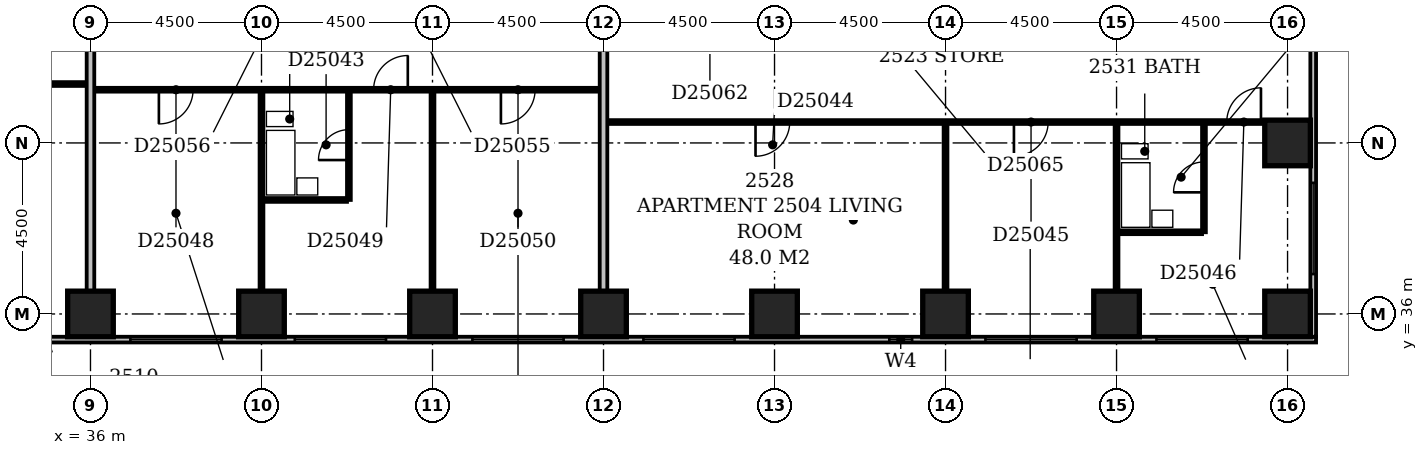
"""IFC4 building model, lengths in metres.
Left out: names, types, materials, properties, quantities, classifications, styles, units other than length and angle.
Written with IfcOpenShell. Run it as: python <this file> out.ifc"""

import sys

from ifc_helpers import new_model, si_unit, direction, frame, frame_2d, origin, origin_2d, place, context, subcontext, project, spatial, rectangle, extrude, element, fill, save


model = new_model("IFC4")
c1 = context("Model", 3, precision=1e-05, world=origin(), true_north=direction((0.0, 1.0)))
c2 = subcontext(c1, "Body", "Model", "MODEL_VIEW")
j1 = project(units=[si_unit("LENGTHUNIT", "METRE"), si_unit("PLANEANGLEUNIT", "RADIAN")], contexts=[c1])
p1 = place(None, origin())
s1 = spatial("IfcSite", under=j1, at=p1, CompositionType="ELEMENT")
p2 = place(p1, origin())
s2 = spatial("IfcBuilding", under=s1, at=p2, CompositionType="ELEMENT")
p3 = place(p2, frame((0.0, 0.0, 101.0)))
s3 = spatial("IfcBuildingStorey", under=s2, at=p3, CompositionType="ELEMENT", Elevation=101.0)
for number, where, z_axis, x_axis in (
    (1, (36.0, 36.0, -0.3), (0.0, 0.0, 1.0), (1.0, 0.0, 0.0)),
    (2, (40.5, 36.0, -0.3), (0.0, 0.0, 1.0), (1.0, 0.0, 0.0)),
    (3, (45.0, 36.0, -0.3), (0.0, 0.0, 1.0), (1.0, 0.0, 0.0)),
    (4, (49.5, 36.0, -0.3), (0.0, 0.0, 1.0), (1.0, 0.0, 0.0)),
    (5, (54.0, 36.0, -0.3), (0.0, 0.0, 1.0), (1.0, 0.0, 0.0)),
    (6, (58.5, 36.0, -0.3), (0.0, 0.0, 1.0), (1.0, 0.0, 0.0)),
    (7, (63.0, 36.0, -0.3), (0.0, 0.0, 1.0), (1.0, 0.0, 0.0)),
    (8, (67.5, 36.0, -0.3), (0.0, 0.0, 1.0), (1.0, 0.0, 0.0)),
    (9, (67.5, 40.5, -0.3), (0.0, 0.0, 1.0), (1.0, 0.0, 0.0)),
):
    element("IfcColumn", number, at=place(p3, frame(where, z_axis=z_axis, x_axis=x_axis)), inside=s3, PredefinedType="COLUMN", context=c2, shape_type="SweptSolid", body=[
        extrude(rectangle(XDim=1.2, YDim=1.2, at=origin_2d()), origin(), (0.0, 0.0, 1.0), 3.6),
    ])
p4 = place(p3, frame((23.1, 35.325, 0.0), z_axis=(0.0, 0.0, 1.0), x_axis=(1.0, 0.0, 0.0)))
e10 = element("IfcWall", 10, at=p4, inside=s3, PredefinedType="STANDARD", context=c2, shape_type="SweptSolid", body=[
    extrude(rectangle(XDim=45.15, YDim=0.15, at=frame_2d((22.575, 0.0))), origin(), (0.0, 0.0, 1.0), 2.7),
])
p5 = place(p4, frame((0.45, 0.0, 0.6)))
e11 = element("IfcOpeningElement", 11, at=p5, cuts=e10, PredefinedType="OPENING", context=c2, shape_type="SweptSolid", body=[
    extrude(rectangle(XDim=2.4, YDim=1.8, at=frame_2d((1.2, 0.9))), frame((0.0, 0.087, 0.0), z_axis=(0.0, -1.0, 0.0), x_axis=(1.0, 0.0, 0.0)), (0.0, 0.0, 1.0), 0.174),
])
p6 = place(p4, frame((5.728, 0.0, 0.6)))
e12 = element("IfcOpeningElement", 12, at=p6, cuts=e10, PredefinedType="OPENING", context=c2, shape_type="SweptSolid", body=[
    extrude(rectangle(XDim=1.8, YDim=1.8, at=frame_2d((0.9, 0.9))), frame((0.0, 0.087, 0.0), z_axis=(0.0, -1.0, 0.0), x_axis=(1.0, 0.0, 0.0)), (0.0, 0.0, 1.0), 0.174),
])
p7 = place(p4, frame((9.45, 0.0, 0.6)))
e13 = element("IfcOpeningElement", 13, at=p7, cuts=e10, PredefinedType="OPENING", context=c2, shape_type="SweptSolid", body=[
    extrude(rectangle(XDim=2.4, YDim=1.8, at=frame_2d((1.2, 0.9))), frame((0.0, 0.087, 0.0), z_axis=(0.0, -1.0, 0.0), x_axis=(1.0, 0.0, 0.0)), (0.0, 0.0, 1.0), 0.174),
])
p8 = place(p4, frame((13.95, 0.0, 0.6)))
e14 = element("IfcOpeningElement", 14, at=p8, cuts=e10, PredefinedType="OPENING", context=c2, shape_type="SweptSolid", body=[
    extrude(rectangle(XDim=2.4, YDim=1.8, at=frame_2d((1.2, 0.9))), frame((0.0, 0.087, 0.0), z_axis=(0.0, -1.0, 0.0), x_axis=(1.0, 0.0, 0.0)), (0.0, 0.0, 1.0), 0.174),
])
p9 = place(p4, frame((18.276, 0.0, 0.6)))
e15 = element("IfcOpeningElement", 15, at=p9, cuts=e10, PredefinedType="OPENING", context=c2, shape_type="SweptSolid", body=[
    extrude(rectangle(XDim=2.4, YDim=1.8, at=frame_2d((1.2, 0.9))), frame((0.0, 0.087, 0.0), z_axis=(0.0, -1.0, 0.0), x_axis=(1.0, 0.0, 0.0)), (0.0, 0.0, 1.0), 0.174),
])
p10 = place(p4, frame((22.95, 0.0, 0.6)))
e16 = element("IfcOpeningElement", 16, at=p10, cuts=e10, PredefinedType="OPENING", context=c2, shape_type="SweptSolid", body=[
    extrude(rectangle(XDim=2.4, YDim=1.8, at=frame_2d((1.2, 0.9))), frame((0.0, 0.087, 0.0), z_axis=(0.0, -1.0, 0.0), x_axis=(1.0, 0.0, 0.0)), (0.0, 0.0, 1.0), 0.174),
])
p11 = place(p4, frame((27.45, 0.0, 0.6)))
e17 = element("IfcOpeningElement", 17, at=p11, cuts=e10, PredefinedType="OPENING", context=c2, shape_type="SweptSolid", body=[
    extrude(rectangle(XDim=2.4, YDim=1.8, at=frame_2d((1.2, 0.9))), frame((0.0, 0.087, 0.0), z_axis=(0.0, -1.0, 0.0), x_axis=(1.0, 0.0, 0.0)), (0.0, 0.0, 1.0), 0.174),
])
p12 = place(p4, frame((33.921, 0.0, 0.6)))
e18 = element("IfcOpeningElement", 18, at=p12, cuts=e10, PredefinedType="OPENING", context=c2, shape_type="SweptSolid", body=[
    extrude(rectangle(XDim=0.6, YDim=1.8, at=frame_2d((0.3, 0.9))), frame((0.0, 0.087, 0.0), z_axis=(0.0, -1.0, 0.0), x_axis=(1.0, 0.0, 0.0)), (0.0, 0.0, 1.0), 0.174),
])
p13 = place(p4, frame((36.45, 0.0, 0.6)))
e19 = element("IfcOpeningElement", 19, at=p13, cuts=e10, PredefinedType="OPENING", context=c2, shape_type="SweptSolid", body=[
    extrude(rectangle(XDim=2.4, YDim=1.8, at=frame_2d((1.2, 0.9))), frame((0.0, 0.087, 0.0), z_axis=(0.0, -1.0, 0.0), x_axis=(1.0, 0.0, 0.0)), (0.0, 0.0, 1.0), 0.174),
])
p14 = place(p4, frame((40.95, 0.0, 0.6)))
e20 = element("IfcOpeningElement", 20, at=p14, cuts=e10, PredefinedType="OPENING", context=c2, shape_type="SweptSolid", body=[
    extrude(rectangle(XDim=2.4, YDim=1.8, at=frame_2d((1.2, 0.9))), frame((0.0, 0.087, 0.0), z_axis=(0.0, -1.0, 0.0), x_axis=(1.0, 0.0, 0.0)), (0.0, 0.0, 1.0), 0.174),
])
p15 = place(p3, frame((68.175, 35.4, 0.0), z_axis=(0.0, 0.0, 1.0), x_axis=(0.0, 1.0, 0.0)))
e21 = element("IfcWall", 21, at=p15, inside=s3, PredefinedType="STANDARD", context=c2, shape_type="SweptSolid", body=[
    extrude(rectangle(XDim=23.85, YDim=0.15, at=frame_2d((11.925, 0.0))), origin(), (0.0, 0.0, 1.0), 2.7),
])
p16 = place(p15, frame((1.65, 0.0, 0.6)))
e22 = element("IfcOpeningElement", 22, at=p16, cuts=e21, PredefinedType="OPENING", context=c2, shape_type="SweptSolid", body=[
    extrude(rectangle(XDim=2.4, YDim=1.8, at=frame_2d((1.2, 0.9))), frame((0.0, 0.087, 0.0), z_axis=(0.0, -1.0, 0.0), x_axis=(1.0, 0.0, 0.0)), (0.0, 0.0, 1.0), 0.174),
])
p17 = place(p15, frame((10.65, 0.0, 0.6)))
e23 = element("IfcOpeningElement", 23, at=p17, cuts=e21, PredefinedType="OPENING", context=c2, shape_type="SweptSolid", body=[
    extrude(rectangle(XDim=2.4, YDim=1.8, at=frame_2d((1.2, 0.9))), frame((0.0, 0.087, 0.0), z_axis=(0.0, -1.0, 0.0), x_axis=(1.0, 0.0, 0.0)), (0.0, 0.0, 1.0), 0.174),
])
p18 = place(p15, frame((20.653, 0.0, 0.6)))
e24 = element("IfcOpeningElement", 24, at=p18, cuts=e21, PredefinedType="OPENING", context=c2, shape_type="SweptSolid", body=[
    extrude(rectangle(XDim=1.5, YDim=1.8, at=frame_2d((0.75, 0.9))), frame((0.0, 0.087, 0.0), z_axis=(0.0, -1.0, 0.0), x_axis=(1.0, 0.0, 0.0)), (0.0, 0.0, 1.0), 0.174),
])
p19 = place(p3, frame((36.0, 36.6, 0.0), z_axis=(0.0, 0.0, 1.0), x_axis=(0.0, 1.0, 0.0)))
e25 = element("IfcWall", 25, at=p19, inside=s3, PredefinedType="PARTITIONING", context=c2, shape_type="SweptSolid", body=[
    extrude(rectangle(XDim=12.8, YDim=0.2, at=frame_2d((6.4, 0.0))), origin(), (0.0, 0.0, 1.0), 2.4),
])
p20 = place(p3, frame((40.5, 36.6, 0.0), z_axis=(0.0, 0.0, 1.0), x_axis=(0.0, 1.0, 0.0)))
e26 = element("IfcWall", 26, at=p20, inside=s3, PredefinedType="PARTITIONING", context=c2, shape_type="SweptSolid", body=[
    extrude(rectangle(XDim=5.25, YDim=0.1, at=frame_2d((2.625, 0.0))), origin(), (0.0, 0.0, 1.0), 3.3),
])
p21 = place(p3, frame((45.0, 36.6, 0.0), z_axis=(0.0, 0.0, 1.0), x_axis=(0.0, 1.0, 0.0)))
e27 = element("IfcWall", 27, at=p21, inside=s3, PredefinedType="PARTITIONING", context=c2, shape_type="SweptSolid", body=[
    extrude(rectangle(XDim=5.25, YDim=0.1, at=frame_2d((2.625, 0.0))), origin(), (0.0, 0.0, 1.0), 2.6),
])
p22 = place(p3, frame((49.5, 36.6, 0.0), z_axis=(0.0, 0.0, 1.0), x_axis=(0.0, 1.0, 0.0)))
e28 = element("IfcWall", 28, at=p22, inside=s3, PredefinedType="PARTITIONING", context=c2, shape_type="SweptSolid", body=[
    extrude(rectangle(XDim=12.8, YDim=0.2, at=frame_2d((6.4, 0.0))), origin(), (0.0, 0.0, 1.0), 3.3),
])
p23 = place(p3, frame((58.5, 36.6, 0.0), z_axis=(0.0, 0.0, 1.0), x_axis=(0.0, 1.0, 0.0)))
e29 = element("IfcWall", 29, at=p23, inside=s3, PredefinedType="PARTITIONING", context=c2, shape_type="SweptSolid", body=[
    extrude(rectangle(XDim=4.4, YDim=0.1, at=frame_2d((2.2, 0.0))), origin(), (0.0, 0.0, 1.0), 3.3),
])
p24 = place(p3, frame((63.0, 36.6, 0.0), z_axis=(0.0, 0.0, 1.0), x_axis=(0.0, 1.0, 0.0)))
e30 = element("IfcWall", 30, at=p24, inside=s3, PredefinedType="PARTITIONING", context=c2, shape_type="SweptSolid", body=[
    extrude(rectangle(XDim=4.4, YDim=0.1, at=frame_2d((2.2, 0.0))), origin(), (0.0, 0.0, 1.0), 2.4),
])
p25 = place(p3, frame((63.05, 38.15, 0.0), z_axis=(0.0, 0.0, 1.0), x_axis=(1.0, 0.0, 0.0)))
e31 = element("IfcWall", 31, at=p25, inside=s3, PredefinedType="PLUMBINGWALL", context=c2, shape_type="SweptSolid", body=[
    extrude(rectangle(XDim=2.2, YDim=0.1, at=frame_2d((1.1, 0.0))), origin(), (0.0, 0.0, 1.0), 3.3),
])
p26 = place(p3, frame((65.3, 38.15, 0.0), z_axis=(0.0, 0.0, 1.0), x_axis=(0.0, 1.0, 0.0)))
e32 = element("IfcWall", 32, at=p26, inside=s3, PredefinedType="PLUMBINGWALL", context=c2, shape_type="SweptSolid", body=[
    extrude(rectangle(XDim=2.85, YDim=0.1, at=frame_2d((1.425, 0.0))), origin(), (0.0, 0.0, 1.0), 3.3),
])
p27 = place(p26, frame((1.05, 0.0, 0.0)))
e33 = element("IfcOpeningElement", 33, at=p27, cuts=e32, PredefinedType="OPENING", context=c2, shape_type="SweptSolid", body=[
    extrude(rectangle(XDim=0.8, YDim=2.1, at=frame_2d((0.4, 1.05))), frame((0.0, 0.062, 0.0), z_axis=(0.0, -1.0, 0.0), x_axis=(1.0, 0.0, 0.0)), (0.0, 0.0, 1.0), 0.124),
])
p28 = place(p3, frame((40.55, 39.0, 0.0), z_axis=(0.0, 0.0, 1.0), x_axis=(1.0, 0.0, 0.0)))
e34 = element("IfcWall", 34, at=p28, inside=s3, PredefinedType="PLUMBINGWALL", context=c2, shape_type="SweptSolid", body=[
    extrude(rectangle(XDim=2.2, YDim=0.1, at=frame_2d((1.1, 0.0))), origin(), (0.0, 0.0, 1.0), 3.3),
])
p29 = place(p3, frame((42.8, 39.0, 0.0), z_axis=(0.0, 0.0, 1.0), x_axis=(0.0, 1.0, 0.0)))
e35 = element("IfcWall", 35, at=p29, inside=s3, PredefinedType="PLUMBINGWALL", context=c2, shape_type="SweptSolid", body=[
    extrude(rectangle(XDim=2.85, YDim=0.1, at=frame_2d((1.425, 0.0))), origin(), (0.0, 0.0, 1.0), 3.3),
])
p30 = place(p29, frame((1.05, 0.0, 0.0)))
e36 = element("IfcOpeningElement", 36, at=p30, cuts=e35, PredefinedType="OPENING", context=c2, shape_type="SweptSolid", body=[
    extrude(rectangle(XDim=0.8, YDim=2.1, at=frame_2d((0.4, 1.05))), frame((0.0, 0.062, 0.0), z_axis=(0.0, -1.0, 0.0), x_axis=(1.0, 0.0, 0.0)), (0.0, 0.0, 1.0), 0.124),
])
p31 = place(p3, frame((49.6, 41.05, 0.0), z_axis=(0.0, 0.0, 1.0), x_axis=(1.0, 0.0, 0.0)))
e37 = element("IfcWall", 37, at=p31, inside=s3, PredefinedType="PARTITIONING", context=c2, shape_type="SweptSolid", body=[
    extrude(rectangle(XDim=17.3, YDim=0.1, at=frame_2d((8.65, 0.0))), origin(), (0.0, 0.0, 1.0), 3.3),
])
p32 = place(p31, frame((3.9, 0.0, 0.0)))
e38 = element("IfcOpeningElement", 38, at=p32, cuts=e37, PredefinedType="OPENING", context=c2, shape_type="SweptSolid", body=[
    extrude(rectangle(XDim=0.9, YDim=2.1, at=frame_2d((0.45, 1.05))), frame((0.0, 0.062, 0.0), z_axis=(0.0, -1.0, 0.0), x_axis=(1.0, 0.0, 0.0)), (0.0, 0.0, 1.0), 0.124),
])
p33 = place(p31, frame((10.7, 0.0, 0.0)))
e39 = element("IfcOpeningElement", 39, at=p33, cuts=e37, PredefinedType="OPENING", context=c2, shape_type="SweptSolid", body=[
    extrude(rectangle(XDim=0.9, YDim=2.1, at=frame_2d((0.45, 1.05))), frame((0.0, 0.062, 0.0), z_axis=(0.0, -1.0, 0.0), x_axis=(1.0, 0.0, 0.0)), (0.0, 0.0, 1.0), 0.124),
])
p34 = place(p31, frame((16.3, 0.0, 0.0)))
e40 = element("IfcOpeningElement", 40, at=p34, cuts=e37, PredefinedType="OPENING", context=c2, shape_type="SweptSolid", body=[
    extrude(rectangle(XDim=0.9, YDim=2.1, at=frame_2d((0.45, 1.05))), frame((0.0, 0.062, 0.0), z_axis=(0.0, -1.0, 0.0), x_axis=(1.0, 0.0, 0.0)), (0.0, 0.0, 1.0), 0.124),
])
p35 = place(p3, frame((36.1, 41.9, 0.0), z_axis=(0.0, 0.0, 1.0), x_axis=(1.0, 0.0, 0.0)))
e41 = element("IfcWall", 41, at=p35, inside=s3, PredefinedType="PARTITIONING", context=c2, shape_type="SweptSolid", body=[
    extrude(rectangle(XDim=13.3, YDim=0.1, at=frame_2d((6.65, 0.0))), origin(), (0.0, 0.0, 1.0), 3.3),
])
p36 = place(p35, frame((1.7, 0.0, 0.0)))
e42 = element("IfcOpeningElement", 42, at=p36, cuts=e41, PredefinedType="OPENING", context=c2, shape_type="SweptSolid", body=[
    extrude(rectangle(XDim=0.9, YDim=2.1, at=frame_2d((0.45, 1.05))), frame((0.0, 0.062, 0.0), z_axis=(0.0, -1.0, 0.0), x_axis=(1.0, 0.0, 0.0)), (0.0, 0.0, 1.0), 0.124),
])
p37 = place(p35, frame((7.35, 0.0, 0.0)))
e43 = element("IfcOpeningElement", 43, at=p37, cuts=e41, PredefinedType="OPENING", context=c2, shape_type="SweptSolid", body=[
    extrude(rectangle(XDim=0.9, YDim=2.1, at=frame_2d((0.45, 1.05))), frame((0.0, 0.062, 0.0), z_axis=(0.0, -1.0, 0.0), x_axis=(1.0, 0.0, 0.0)), (0.0, 0.0, 1.0), 0.124),
])
p38 = place(p35, frame((10.7, 0.0, 0.0)))
e44 = element("IfcOpeningElement", 44, at=p38, cuts=e41, PredefinedType="OPENING", context=c2, shape_type="SweptSolid", body=[
    extrude(rectangle(XDim=0.9, YDim=2.1, at=frame_2d((0.45, 1.05))), frame((0.0, 0.062, 0.0), z_axis=(0.0, -1.0, 0.0), x_axis=(1.0, 0.0, 0.0)), (0.0, 0.0, 1.0), 0.124),
])
p39 = place(p3, frame((27.1, 42.05, 0.0), z_axis=(0.0, 0.0, 1.0), x_axis=(1.0, 0.0, 0.0)))
e45 = element("IfcWall", 45, at=p39, inside=s3, PredefinedType="PARTITIONING", context=c2, shape_type="SweptSolid", body=[
    extrude(rectangle(XDim=8.8, YDim=0.1, at=frame_2d((4.4, 0.0))), origin(), (0.0, 0.0, 1.0), 3.3),
])
p40 = place(p39, frame((1.7, 0.0, 0.0)))
e46 = element("IfcOpeningElement", 46, at=p40, cuts=e45, PredefinedType="OPENING", context=c2, shape_type="SweptSolid", body=[
    extrude(rectangle(XDim=0.9, YDim=2.1, at=frame_2d((0.45, 1.05))), frame((0.0, 0.062, 0.0), z_axis=(0.0, -1.0, 0.0), x_axis=(1.0, 0.0, 0.0)), (0.0, 0.0, 1.0), 0.124),
])
p41 = place(p39, frame((6.2, 0.0, 0.0)))
e47 = element("IfcOpeningElement", 47, at=p41, cuts=e45, PredefinedType="OPENING", context=c2, shape_type="SweptSolid", body=[
    extrude(rectangle(XDim=0.9, YDim=2.1, at=frame_2d((0.45, 1.05))), frame((0.0, 0.062, 0.0), z_axis=(0.0, -1.0, 0.0), x_axis=(1.0, 0.0, 0.0)), (0.0, 0.0, 1.0), 0.124),
])
p42 = place(p8, origin())
e48 = element("IfcWindow", 48, at=p42, inside=s3, PartitioningType="SINGLE_PANEL", PredefinedType="WINDOW", context=c2, shape_type="SweptSolid", body=[
    extrude(rectangle(XDim=2.4, YDim=1.8, at=frame_2d((1.2, 0.9))), frame((0.0, 0.03, 0.0), z_axis=(0.0, -1.0, 0.0), x_axis=(1.0, 0.0, 0.0)), (0.0, 0.0, 1.0), 0.06),
])
fill(e14, e48)
p43 = place(p9, origin())
e49 = element("IfcWindow", 49, at=p43, inside=s3, PartitioningType="SINGLE_PANEL", PredefinedType="WINDOW", context=c2, shape_type="SweptSolid", body=[
    extrude(rectangle(XDim=2.4, YDim=1.8, at=frame_2d((1.2, 0.9))), frame((0.0, 0.03, 0.0), z_axis=(0.0, -1.0, 0.0), x_axis=(1.0, 0.0, 0.0)), (0.0, 0.0, 1.0), 0.06),
])
fill(e15, e49)
p44 = place(p10, origin())
e50 = element("IfcWindow", 50, at=p44, inside=s3, PartitioningType="SINGLE_PANEL", PredefinedType="WINDOW", context=c2, shape_type="SweptSolid", body=[
    extrude(rectangle(XDim=2.4, YDim=1.8, at=frame_2d((1.2, 0.9))), frame((0.0, 0.03, 0.0), z_axis=(0.0, -1.0, 0.0), x_axis=(1.0, 0.0, 0.0)), (0.0, 0.0, 1.0), 0.06),
])
fill(e16, e50)
p45 = place(p11, origin())
e51 = element("IfcWindow", 51, at=p45, inside=s3, PartitioningType="SINGLE_PANEL", PredefinedType="WINDOW", context=c2, shape_type="SweptSolid", body=[
    extrude(rectangle(XDim=2.4, YDim=1.8, at=frame_2d((1.2, 0.9))), frame((0.0, 0.03, 0.0), z_axis=(0.0, -1.0, 0.0), x_axis=(1.0, 0.0, 0.0)), (0.0, 0.0, 1.0), 0.06),
])
fill(e17, e51)
p46 = place(p12, origin())
e52 = element("IfcWindow", 52, at=p46, inside=s3, PartitioningType="SINGLE_PANEL", PredefinedType="WINDOW", context=c2, shape_type="SweptSolid", body=[
    extrude(rectangle(XDim=0.6, YDim=1.8, at=frame_2d((0.3, 0.9))), frame((0.0, 0.03, 0.0), z_axis=(0.0, -1.0, 0.0), x_axis=(1.0, 0.0, 0.0)), (0.0, 0.0, 1.0), 0.06),
])
fill(e18, e52)
p47 = place(p13, origin())
e53 = element("IfcWindow", 53, at=p47, inside=s3, PartitioningType="SINGLE_PANEL", PredefinedType="WINDOW", context=c2, shape_type="SweptSolid", body=[
    extrude(rectangle(XDim=2.4, YDim=1.8, at=frame_2d((1.2, 0.9))), frame((0.0, 0.03, 0.0), z_axis=(0.0, -1.0, 0.0), x_axis=(1.0, 0.0, 0.0)), (0.0, 0.0, 1.0), 0.06),
])
fill(e19, e53)
p48 = place(p14, origin())
e54 = element("IfcWindow", 54, at=p48, inside=s3, PartitioningType="SINGLE_PANEL", PredefinedType="WINDOW", context=c2, shape_type="SweptSolid", body=[
    extrude(rectangle(XDim=2.4, YDim=1.8, at=frame_2d((1.2, 0.9))), frame((0.0, 0.03, 0.0), z_axis=(0.0, -1.0, 0.0), x_axis=(1.0, 0.0, 0.0)), (0.0, 0.0, 1.0), 0.06),
])
fill(e20, e54)
p49 = place(p16, origin())
e55 = element("IfcWindow", 55, at=p49, inside=s3, PartitioningType="SINGLE_PANEL", PredefinedType="WINDOW", context=c2, shape_type="SweptSolid", body=[
    extrude(rectangle(XDim=2.4, YDim=1.8, at=frame_2d((1.2, 0.9))), frame((0.0, 0.03, 0.0), z_axis=(0.0, -1.0, 0.0), x_axis=(1.0, 0.0, 0.0)), (0.0, 0.0, 1.0), 0.06),
])
fill(e22, e55)
p50 = place(p27, origin())
e56 = element("IfcDoor", 56, at=p50, inside=s3, OperationType="SINGLE_SWING_LEFT", PredefinedType="DOOR", context=c2, shape_type="SweptSolid", body=[
    extrude(rectangle(XDim=0.8, YDim=2.1, at=frame_2d((0.4, 1.05))), frame((0.0, 0.025, 0.0), z_axis=(0.0, -1.0, 0.0), x_axis=(1.0, 0.0, 0.0)), (0.0, 0.0, 1.0), 0.05),
])
fill(e33, e56)
p51 = place(p30, origin())
e57 = element("IfcDoor", 57, at=p51, inside=s3, OperationType="SINGLE_SWING_LEFT", PredefinedType="DOOR", context=c2, shape_type="SweptSolid", body=[
    extrude(rectangle(XDim=0.8, YDim=2.1, at=frame_2d((0.4, 1.05))), frame((0.0, 0.025, 0.0), z_axis=(0.0, -1.0, 0.0), x_axis=(1.0, 0.0, 0.0)), (0.0, 0.0, 1.0), 0.05),
])
fill(e36, e57)
p52 = place(p32, frame((0.9, 0.0, 0.0), z_axis=(0.0, 0.0, 1.0), x_axis=(-1.0, 0.0, 0.0)))
e58 = element("IfcDoor", 58, at=p52, inside=s3, OperationType="SINGLE_SWING_RIGHT", PredefinedType="DOOR", context=c2, shape_type="SweptSolid", body=[
    extrude(rectangle(XDim=0.9, YDim=2.1, at=frame_2d((0.45, 1.05))), frame((0.0, 0.025, 0.0), z_axis=(0.0, -1.0, 0.0), x_axis=(1.0, 0.0, 0.0)), (0.0, 0.0, 1.0), 0.05),
])
fill(e38, e58)
p53 = place(p33, frame((0.9, 0.0, 0.0), z_axis=(0.0, 0.0, 1.0), x_axis=(-1.0, 0.0, 0.0)))
e59 = element("IfcDoor", 59, at=p53, inside=s3, OperationType="SINGLE_SWING_RIGHT", PredefinedType="DOOR", context=c2, shape_type="SweptSolid", body=[
    extrude(rectangle(XDim=0.9, YDim=2.1, at=frame_2d((0.45, 1.05))), frame((0.0, 0.025, 0.0), z_axis=(0.0, -1.0, 0.0), x_axis=(1.0, 0.0, 0.0)), (0.0, 0.0, 1.0), 0.05),
])
fill(e39, e59)
p54 = place(p34, frame((0.9, 0.0, 0.0), z_axis=(0.0, 0.0, 1.0), x_axis=(-1.0, 0.0, 0.0)))
e60 = element("IfcDoor", 60, at=p54, inside=s3, OperationType="SINGLE_SWING_LEFT", PredefinedType="DOOR", context=c2, shape_type="SweptSolid", body=[
    extrude(rectangle(XDim=0.9, YDim=2.1, at=frame_2d((0.45, 1.05))), frame((0.0, 0.025, 0.0), z_axis=(0.0, -1.0, 0.0), x_axis=(1.0, 0.0, 0.0)), (0.0, 0.0, 1.0), 0.05),
])
fill(e40, e60)
p55 = place(p36, frame((0.9, 0.0, 0.0), z_axis=(0.0, 0.0, 1.0), x_axis=(-1.0, 0.0, 0.0)))
e61 = element("IfcDoor", 61, at=p55, inside=s3, OperationType="SINGLE_SWING_RIGHT", PredefinedType="DOOR", context=c2, shape_type="SweptSolid", body=[
    extrude(rectangle(XDim=0.9, YDim=2.1, at=frame_2d((0.45, 1.05))), frame((0.0, 0.025, 0.0), z_axis=(0.0, -1.0, 0.0), x_axis=(1.0, 0.0, 0.0)), (0.0, 0.0, 1.0), 0.05),
])
fill(e42, e61)
p56 = place(p37, frame((0.9, 0.0, 0.0), z_axis=(0.0, 0.0, 1.0), x_axis=(-1.0, 0.0, 0.0)))
e62 = element("IfcDoor", 62, at=p56, inside=s3, OperationType="SINGLE_SWING_LEFT", PredefinedType="DOOR", context=c2, shape_type="SweptSolid", body=[
    extrude(rectangle(XDim=0.9, YDim=2.1, at=frame_2d((0.45, 1.05))), frame((0.0, 0.025, 0.0), z_axis=(0.0, -1.0, 0.0), x_axis=(1.0, 0.0, 0.0)), (0.0, 0.0, 1.0), 0.05),
])
fill(e43, e62)
p57 = place(p38, frame((0.9, 0.0, 0.0), z_axis=(0.0, 0.0, 1.0), x_axis=(-1.0, 0.0, 0.0)))
e63 = element("IfcDoor", 63, at=p57, inside=s3, OperationType="SINGLE_SWING_RIGHT", PredefinedType="DOOR", context=c2, shape_type="SweptSolid", body=[
    extrude(rectangle(XDim=0.9, YDim=2.1, at=frame_2d((0.45, 1.05))), frame((0.0, 0.025, 0.0), z_axis=(0.0, -1.0, 0.0), x_axis=(1.0, 0.0, 0.0)), (0.0, 0.0, 1.0), 0.05),
])
fill(e44, e63)
save(model, sys.argv[1])
